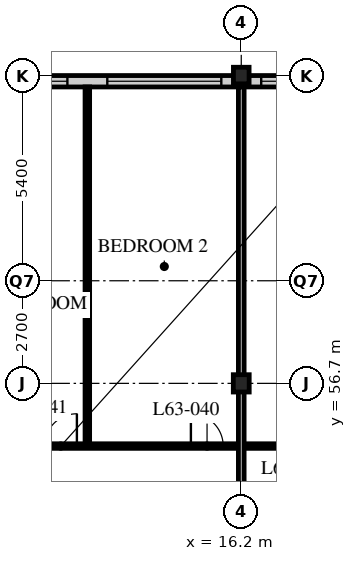
"""IFC4 building model, lengths in metres.
Left out: names, types, materials, properties, quantities, classifications, styles, units other than length and angle.
Written with IfcOpenShell. Run it as: python <this file> out.ifc"""

import sys

from ifc_helpers import new_model, si_unit, direction, frame, frame_2d, origin, origin_2d, place, context, subcontext, project, spatial, rectangle, i_section, extrude, element, fill, save


model = new_model("IFC4")
c1 = context("Model", 3, precision=1e-05, world=origin(), true_north=direction((0.0, 1.0)))
c2 = subcontext(c1, "Body", "Model", "MODEL_VIEW")
j1 = project(units=[si_unit("LENGTHUNIT", "METRE"), si_unit("PLANEANGLEUNIT", "RADIAN")], contexts=[c1])
p1 = place(None, origin())
s1 = spatial("IfcSite", under=j1, at=p1, CompositionType="ELEMENT")
p2 = place(p1, origin())
s2 = spatial("IfcBuilding", under=s1, at=p2, CompositionType="ELEMENT")
p3 = place(p2, frame((0.0, 0.0, 246.3)))
s3 = spatial("IfcBuildingStorey", under=s2, at=p3, CompositionType="ELEMENT", Elevation=246.3)
p4 = place(p3, frame((16.2, 56.7, 0.0), z_axis=(0.0, 0.0, 1.0), x_axis=(1.0, 0.0, 0.0)))
e1 = element("IfcColumn", 1, at=p4, inside=s3, PredefinedType="COLUMN", context=c2, shape_type="SweptSolid", body=[
    extrude(i_section(OverallWidth=0.418, OverallDepth=0.456, WebThickness=0.042, FlangeThickness=0.067, FilletRadius=0.015, at=origin_2d()), origin(), (0.0, 0.0, 1.0), 3.9),
])
p5 = place(p3, frame((16.2, 64.8, 0.0), z_axis=(0.0, 0.0, 1.0), x_axis=(1.0, 0.0, 0.0)))
e2 = element("IfcColumn", 2, at=p5, inside=s3, PredefinedType="COLUMN", context=c2, shape_type="SweptSolid", body=[
    extrude(i_section(OverallWidth=0.412, OverallDepth=0.437, WebThickness=0.036, FlangeThickness=0.058, FilletRadius=0.015, at=origin_2d()), origin(), (0.0, 0.0, 1.0), 3.9),
])
p6 = place(p3, frame((48.3, 64.65, 0.0), z_axis=(0.0, 0.0, 1.0), x_axis=(-1.0, 0.0, 0.0)))
e3 = element("IfcWall", 3, at=p6, inside=s3, PredefinedType="SOLIDWALL", context=c2, shape_type="SweptSolid", body=[
    extrude(rectangle(XDim=40.2, YDim=0.3, at=frame_2d((20.1, 0.0))), origin(), (0.0, 0.0, 1.0), 3.69),
])
p7 = place(p6, frame((0.225, 0.0, 0.6)))
e4 = element("IfcOpeningElement", 4, at=p7, cuts=e3, PredefinedType="OPENING", context=c2, shape_type="SweptSolid", body=[
    extrude(rectangle(XDim=3.0, YDim=2.4, at=frame_2d((1.5, 1.2))), frame((0.0, 0.16, 0.0), z_axis=(0.0, -1.0, 0.0), x_axis=(1.0, 0.0, 0.0)), (0.0, 0.0, 1.0), 0.32),
])
p8 = place(p6, frame((4.275, 0.0, 0.6)))
e5 = element("IfcOpeningElement", 5, at=p8, cuts=e3, PredefinedType="OPENING", context=c2, shape_type="SweptSolid", body=[
    extrude(rectangle(XDim=3.0, YDim=2.4, at=frame_2d((1.5, 1.2))), frame((0.0, 0.16, 0.0), z_axis=(0.0, -1.0, 0.0), x_axis=(1.0, 0.0, 0.0)), (0.0, 0.0, 1.0), 0.32),
])
p9 = place(p6, frame((8.325, 0.0, 0.6)))
e6 = element("IfcOpeningElement", 6, at=p9, cuts=e3, PredefinedType="OPENING", context=c2, shape_type="SweptSolid", body=[
    extrude(rectangle(XDim=3.0, YDim=2.4, at=frame_2d((1.5, 1.2))), frame((0.0, 0.16, 0.0), z_axis=(0.0, -1.0, 0.0), x_axis=(1.0, 0.0, 0.0)), (0.0, 0.0, 1.0), 0.32),
])
p10 = place(p6, frame((12.375, 0.0, 0.6)))
e7 = element("IfcOpeningElement", 7, at=p10, cuts=e3, PredefinedType="OPENING", context=c2, shape_type="SweptSolid", body=[
    extrude(rectangle(XDim=3.0, YDim=2.4, at=frame_2d((1.5, 1.2))), frame((0.0, 0.16, 0.0), z_axis=(0.0, -1.0, 0.0), x_axis=(1.0, 0.0, 0.0)), (0.0, 0.0, 1.0), 0.32),
])
p11 = place(p6, frame((16.425, 0.0, 0.6)))
e8 = element("IfcOpeningElement", 8, at=p11, cuts=e3, PredefinedType="OPENING", context=c2, shape_type="SweptSolid", body=[
    extrude(rectangle(XDim=3.0, YDim=2.4, at=frame_2d((1.5, 1.2))), frame((0.0, 0.16, 0.0), z_axis=(0.0, -1.0, 0.0), x_axis=(1.0, 0.0, 0.0)), (0.0, 0.0, 1.0), 0.32),
])
p12 = place(p6, frame((20.475, 0.0, 0.6)))
e9 = element("IfcOpeningElement", 9, at=p12, cuts=e3, PredefinedType="OPENING", context=c2, shape_type="SweptSolid", body=[
    extrude(rectangle(XDim=3.0, YDim=2.4, at=frame_2d((1.5, 1.2))), frame((0.0, 0.16, 0.0), z_axis=(0.0, -1.0, 0.0), x_axis=(1.0, 0.0, 0.0)), (0.0, 0.0, 1.0), 0.32),
])
p13 = place(p6, frame((24.525, 0.0, 0.6)))
e10 = element("IfcOpeningElement", 10, at=p13, cuts=e3, PredefinedType="OPENING", context=c2, shape_type="SweptSolid", body=[
    extrude(rectangle(XDim=3.0, YDim=2.4, at=frame_2d((1.5, 1.2))), frame((0.0, 0.16, 0.0), z_axis=(0.0, -1.0, 0.0), x_axis=(1.0, 0.0, 0.0)), (0.0, 0.0, 1.0), 0.32),
])
p14 = place(p6, frame((28.575, 0.0, 0.6)))
e11 = element("IfcOpeningElement", 11, at=p14, cuts=e3, PredefinedType="OPENING", context=c2, shape_type="SweptSolid", body=[
    extrude(rectangle(XDim=3.0, YDim=2.4, at=frame_2d((1.5, 1.2))), frame((0.0, 0.16, 0.0), z_axis=(0.0, -1.0, 0.0), x_axis=(1.0, 0.0, 0.0)), (0.0, 0.0, 1.0), 0.32),
])
p15 = place(p6, frame((32.625, 0.0, 0.6)))
e12 = element("IfcOpeningElement", 12, at=p15, cuts=e3, PredefinedType="OPENING", context=c2, shape_type="SweptSolid", body=[
    extrude(rectangle(XDim=3.0, YDim=2.4, at=frame_2d((1.5, 1.2))), frame((0.0, 0.16, 0.0), z_axis=(0.0, -1.0, 0.0), x_axis=(1.0, 0.0, 0.0)), (0.0, 0.0, 1.0), 0.32),
])
p16 = place(p6, frame((36.675, 0.0, 0.6)))
e13 = element("IfcOpeningElement", 13, at=p16, cuts=e3, PredefinedType="OPENING", context=c2, shape_type="SweptSolid", body=[
    extrude(rectangle(XDim=3.0, YDim=2.4, at=frame_2d((1.5, 1.2))), frame((0.0, 0.16, 0.0), z_axis=(0.0, -1.0, 0.0), x_axis=(1.0, 0.0, 0.0)), (0.0, 0.0, 1.0), 0.32),
])
p17 = place(p3, frame((8.15, 55.05, 0.0), z_axis=(0.0, 0.0, 1.0), x_axis=(1.0, 0.0, 0.0)))
e14 = element("IfcWall", 14, at=p17, inside=s3, PredefinedType="PARTITIONING", context=c2, shape_type="SweptSolid", body=[
    extrude(rectangle(XDim=28.3, YDim=0.12, at=frame_2d((14.15, 0.0))), origin(), (0.0, 0.0, 1.0), 3.69),
])
p18 = place(p17, frame((9.025, 0.0, 0.0)))
e15 = element("IfcOpeningElement", 15, at=p18, cuts=e14, PredefinedType="OPENING", context=c2, shape_type="SweptSolid", body=[
    extrude(rectangle(XDim=0.85, YDim=2.1, at=frame_2d((0.425, 1.05))), frame((0.0, 0.07, 0.0), z_axis=(0.0, -1.0, 0.0), x_axis=(1.0, 0.0, 0.0)), (0.0, 0.0, 1.0), 0.14),
])
p19 = place(p17, frame((16.475, 0.0, 0.0)))
e16 = element("IfcOpeningElement", 16, at=p19, cuts=e14, PredefinedType="OPENING", context=c2, shape_type="SweptSolid", body=[
    extrude(rectangle(XDim=0.85, YDim=2.1, at=frame_2d((0.425, 1.05))), frame((0.0, 0.07, 0.0), z_axis=(0.0, -1.0, 0.0), x_axis=(1.0, 0.0, 0.0)), (0.0, 0.0, 1.0), 0.14),
])
p20 = place(p17, frame((20.525, 0.0, 0.0)))
e17 = element("IfcOpeningElement", 17, at=p20, cuts=e14, PredefinedType="OPENING", context=c2, shape_type="SweptSolid", body=[
    extrude(rectangle(XDim=0.85, YDim=2.1, at=frame_2d((0.425, 1.05))), frame((0.0, 0.07, 0.0), z_axis=(0.0, -1.0, 0.0), x_axis=(1.0, 0.0, 0.0)), (0.0, 0.0, 1.0), 0.14),
])
p21 = place(p17, frame((24.575, 0.0, 0.0)))
e18 = element("IfcOpeningElement", 18, at=p21, cuts=e14, PredefinedType="OPENING", context=c2, shape_type="SweptSolid", body=[
    extrude(rectangle(XDim=0.85, YDim=2.1, at=frame_2d((0.425, 1.05))), frame((0.0, 0.07, 0.0), z_axis=(0.0, -1.0, 0.0), x_axis=(1.0, 0.0, 0.0)), (0.0, 0.0, 1.0), 0.14),
])
p22 = place(p17, frame((6.725, 0.0, 0.0)))
e19 = element("IfcOpeningElement", 19, at=p22, cuts=e14, PredefinedType="OPENING", context=c2, shape_type="SweptSolid", body=[
    extrude(rectangle(XDim=0.85, YDim=2.1, at=frame_2d((0.425, 1.05))), frame((0.0, 0.07, 0.0), z_axis=(0.0, -1.0, 0.0), x_axis=(1.0, 0.0, 0.0)), (0.0, 0.0, 1.0), 0.14),
])
p23 = place(p17, frame((2.875, 0.0, 0.0)))
e20 = element("IfcOpeningElement", 20, at=p23, cuts=e14, PredefinedType="OPENING", context=c2, shape_type="SweptSolid", body=[
    extrude(rectangle(XDim=0.85, YDim=2.1, at=frame_2d((0.425, 1.05))), frame((0.0, 0.07, 0.0), z_axis=(0.0, -1.0, 0.0), x_axis=(1.0, 0.0, 0.0)), (0.0, 0.0, 1.0), 0.14),
])
p24 = place(p3, frame((12.15, 55.05, 0.0), z_axis=(0.0, 0.0, 1.0), x_axis=(0.0, 1.0, 0.0)))
e21 = element("IfcWall", 21, at=p24, inside=s3, PredefinedType="PARTITIONING", context=c2, shape_type="SweptSolid", body=[
    extrude(rectangle(XDim=9.45, YDim=0.12, at=frame_2d((4.725, 0.0))), origin(), (0.0, 0.0, 1.0), 3.69),
])
p25 = place(p3, frame((16.2, 52.65, 0.0), z_axis=(0.0, 0.0, 1.0), x_axis=(0.0, 1.0, 0.0)))
e22 = element("IfcWall", 22, at=p25, inside=s3, PredefinedType="PARTITIONING", context=c2, shape_type="SweptSolid", body=[
    extrude(rectangle(XDim=11.85, YDim=0.15, at=frame_2d((5.925, 0.0))), origin(), (0.0, 0.0, 1.0), 3.078),
])
p26 = place(p14, origin())
e23 = element("IfcWindow", 23, at=p26, inside=s3, PartitioningType="SINGLE_PANEL", PredefinedType="WINDOW", context=c2, shape_type="SweptSolid", body=[
    extrude(rectangle(XDim=3.0, YDim=2.4, at=frame_2d((1.5, 1.2))), frame((0.0, 0.03, 0.0), z_axis=(0.0, -1.0, 0.0), x_axis=(1.0, 0.0, 0.0)), (0.0, 0.0, 1.0), 0.06),
])
fill(e11, e23)
p27 = place(p15, origin())
e24 = element("IfcWindow", 24, at=p27, inside=s3, PartitioningType="SINGLE_PANEL", PredefinedType="WINDOW", context=c2, shape_type="SweptSolid", body=[
    extrude(rectangle(XDim=3.0, YDim=2.4, at=frame_2d((1.5, 1.2))), frame((0.0, 0.03, 0.0), z_axis=(0.0, -1.0, 0.0), x_axis=(1.0, 0.0, 0.0)), (0.0, 0.0, 1.0), 0.06),
])
fill(e12, e24)
p28 = place(p16, origin())
e25 = element("IfcWindow", 25, at=p28, inside=s3, PartitioningType="SINGLE_PANEL", PredefinedType="WINDOW", context=c2, shape_type="SweptSolid", body=[
    extrude(rectangle(XDim=3.0, YDim=2.4, at=frame_2d((1.5, 1.2))), frame((0.0, 0.03, 0.0), z_axis=(0.0, -1.0, 0.0), x_axis=(1.0, 0.0, 0.0)), (0.0, 0.0, 1.0), 0.06),
])
fill(e13, e25)
p29 = place(p22, origin())
e26 = element("IfcDoor", 26, at=p29, inside=s3, OperationType="SINGLE_SWING_LEFT", PredefinedType="DOOR", context=c2, shape_type="SweptSolid", body=[
    extrude(rectangle(XDim=0.85, YDim=2.1, at=frame_2d((0.425, 1.05))), frame((0.0, 0.025, 0.0), z_axis=(0.0, -1.0, 0.0), x_axis=(1.0, 0.0, 0.0)), (0.0, 0.0, 1.0), 0.05),
])
fill(e19, e26)
p30 = place(p23, origin())
e27 = element("IfcDoor", 27, at=p30, inside=s3, OperationType="SINGLE_SWING_RIGHT", PredefinedType="DOOR", context=c2, shape_type="SweptSolid", body=[
    extrude(rectangle(XDim=0.85, YDim=2.1, at=frame_2d((0.425, 1.05))), frame((0.0, 0.025, 0.0), z_axis=(0.0, -1.0, 0.0), x_axis=(1.0, 0.0, 0.0)), (0.0, 0.0, 1.0), 0.05),
])
fill(e20, e27)
save(model, sys.argv[1])
